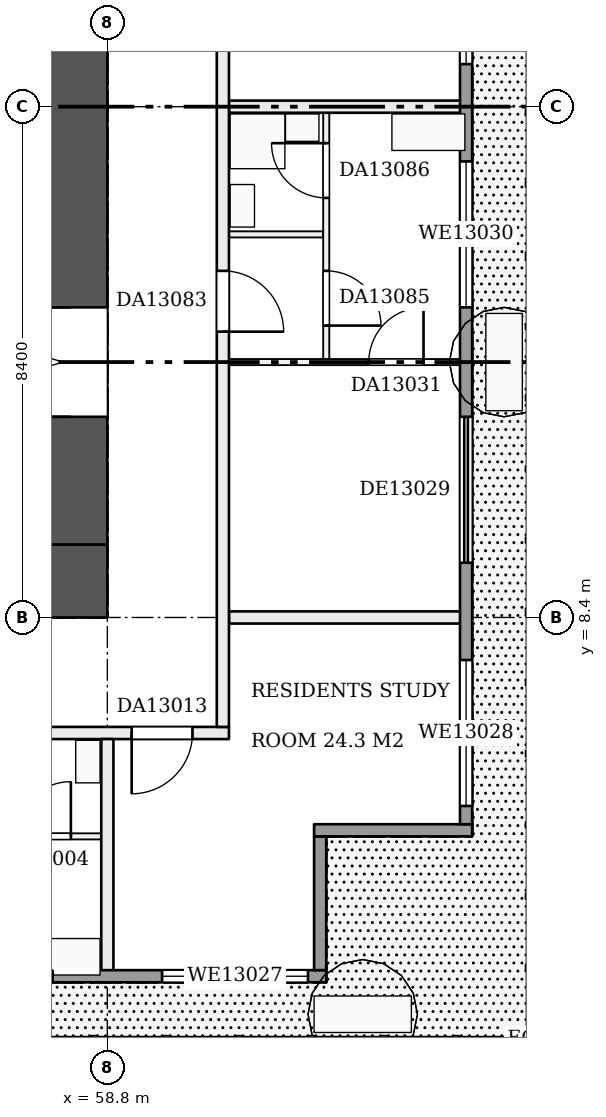
"""IFC4 building model, lengths in metres.
Left out: names, types, materials, properties, quantities, classifications, styles, units other than length and angle.
Written with IfcOpenShell. Run it as: python <this file> out.ifc"""

import sys

from ifc_helpers import new_model, si_unit, direction, frame, frame_2d, origin, place, context, subcontext, project, spatial, rectangle, extrude, element, fill, save


model = new_model("IFC4")
c1 = context("Model", 3, precision=1e-05, world=origin(), true_north=direction((0.0, 1.0)))
c2 = subcontext(c1, "Body", "Model", "MODEL_VIEW")
j1 = project(units=[si_unit("LENGTHUNIT", "METRE"), si_unit("PLANEANGLEUNIT", "RADIAN")], contexts=[c1])
p1 = place(None, origin())
s1 = spatial("IfcSite", under=j1, at=p1, CompositionType="ELEMENT")
p2 = place(p1, origin())
s2 = spatial("IfcBuilding", under=s1, at=p2, CompositionType="ELEMENT")
p3 = place(p2, frame((0.0, 0.0, 56.7)))
s3 = spatial("IfcBuildingStorey", under=s2, at=p3, CompositionType="ELEMENT", Elevation=56.7)
p4 = place(p3, frame((42.0, 9.0, 0.0), z_axis=(0.0, 0.0, 1.0), x_axis=(1.0, 0.0, 0.0)))
e1 = element("IfcWall", 1, at=p4, inside=s3, PredefinedType="SHEAR", context=c2, shape_type="SweptSolid", body=[
    extrude(rectangle(XDim=16.8, YDim=1.2, at=frame_2d((8.4, 0.0))), origin(), (0.0, 0.0, 1.0), 3.22),
])
p5 = place(p4, frame((3.1, 0.0, 0.0)))
e2 = element("IfcOpeningElement", 2, at=p5, cuts=e1, PredefinedType="OPENING", context=c2, shape_type="SweptSolid", body=[
    extrude(rectangle(XDim=1.0, YDim=2.1, at=frame_2d((0.5, 1.05))), frame((0.0, 0.61, 0.0), z_axis=(0.0, -1.0, 0.0), x_axis=(1.0, 0.0, 0.0)), (0.0, 0.0, 1.0), 1.22),
])
p6 = place(p4, frame((12.7, 0.0, 0.0)))
e3 = element("IfcOpeningElement", 3, at=p6, cuts=e1, PredefinedType="OPENING", context=c2, shape_type="SweptSolid", body=[
    extrude(rectangle(XDim=1.0, YDim=2.1, at=frame_2d((0.5, 1.05))), frame((0.0, 0.61, 0.0), z_axis=(0.0, -1.0, 0.0), x_axis=(1.0, 0.0, 0.0)), (0.0, 0.0, 1.0), 1.22),
])
p7 = place(p3, frame((58.2, 9.6, 0.0), z_axis=(0.0, 0.0, 1.0), x_axis=(0.0, 1.0, 0.0)))
e4 = element("IfcWall", 4, at=p7, inside=s3, PredefinedType="SHEAR", context=c2, shape_type="SweptSolid", body=[
    extrude(rectangle(XDim=14.4, YDim=1.2, at=frame_2d((7.2, 0.0))), origin(), (0.0, 0.0, 1.0), 3.22),
])
p8 = place(p7, frame((2.1, 0.0, 0.0)))
e5 = element("IfcOpeningElement", 5, at=p8, cuts=e4, PredefinedType="OPENING", context=c2, shape_type="SweptSolid", body=[
    extrude(rectangle(XDim=1.8, YDim=2.1, at=frame_2d((0.9, 1.05))), frame((0.0, 0.61, 0.0), z_axis=(0.0, -1.0, 0.0), x_axis=(1.0, 0.0, 0.0)), (0.0, 0.0, 1.0), 1.22),
])
p9 = place(p3, frame((54.65, 4.8, 0.0), z_axis=(0.0, 0.0, 1.0), x_axis=(1.0, 0.0, 0.0)))
e6 = element("IfcWall", 6, at=p9, inside=s3, PredefinedType="PARTITIONING", context=c2, shape_type="SweptSolid", body=[
    extrude(rectangle(XDim=4.05, YDim=0.1, at=frame_2d((2.025, 0.0))), origin(), (0.0, 0.0, 1.0), 3.22),
])
p10 = place(p9, frame((0.55, 0.0, 0.0)))
e7 = element("IfcOpeningElement", 7, at=p10, cuts=e6, PredefinedType="OPENING", context=c2, shape_type="SweptSolid", body=[
    extrude(rectangle(XDim=0.9, YDim=2.1, at=frame_2d((0.45, 1.05))), frame((0.0, 0.06, 0.0), z_axis=(0.0, -1.0, 0.0), x_axis=(1.0, 0.0, 0.0)), (0.0, 0.0, 1.0), 0.12),
])
p11 = place(p9, frame((2.65, 0.0, 0.0)))
e8 = element("IfcOpeningElement", 8, at=p11, cuts=e6, PredefinedType="OPENING", context=c2, shape_type="SweptSolid", body=[
    extrude(rectangle(XDim=0.9, YDim=2.1, at=frame_2d((0.45, 1.05))), frame((0.0, 0.06, 0.0), z_axis=(0.0, -1.0, 0.0), x_axis=(1.0, 0.0, 0.0)), (0.0, 0.0, 1.0), 0.12),
])
p12 = place(p3, frame((42.1, 6.5, 0.0), z_axis=(0.0, 0.0, 1.0), x_axis=(1.0, 0.0, 0.0)))
e9 = element("IfcWall", 9, at=p12, inside=s3, PredefinedType="PARTITIONING", context=c2, shape_type="SweptSolid", body=[
    extrude(rectangle(XDim=18.7, YDim=0.2, at=frame_2d((9.35, 0.0))), origin(), (0.0, 0.0, 1.0), 3.22),
])
p13 = place(p12, frame((4.6, 0.0, 0.0)))
e10 = element("IfcOpeningElement", 10, at=p13, cuts=e9, PredefinedType="OPENING", context=c2, shape_type="SweptSolid", body=[
    extrude(rectangle(XDim=1.0, YDim=2.1, at=frame_2d((0.5, 1.05))), frame((0.0, 0.11, 0.0), z_axis=(0.0, -1.0, 0.0), x_axis=(1.0, 0.0, 0.0)), (0.0, 0.0, 1.0), 0.22),
])
p14 = place(p12, frame((13.1, 0.0, 0.0)))
e11 = element("IfcOpeningElement", 11, at=p14, cuts=e9, PredefinedType="OPENING", context=c2, shape_type="SweptSolid", body=[
    extrude(rectangle(XDim=1.0, YDim=2.1, at=frame_2d((0.5, 1.05))), frame((0.0, 0.11, 0.0), z_axis=(0.0, -1.0, 0.0), x_axis=(1.0, 0.0, 0.0)), (0.0, 0.0, 1.0), 0.22),
])
p15 = place(p12, frame((17.1, 0.0, 0.0)))
e12 = element("IfcOpeningElement", 12, at=p15, cuts=e9, PredefinedType="OPENING", context=c2, shape_type="SweptSolid", body=[
    extrude(rectangle(XDim=1.0, YDim=2.1, at=frame_2d((0.5, 1.05))), frame((0.0, 0.11, 0.0), z_axis=(0.0, -1.0, 0.0), x_axis=(1.0, 0.0, 0.0)), (0.0, 0.0, 1.0), 0.22),
])
p16 = place(p3, frame((60.8, 8.4, 0.0), z_axis=(0.0, 0.0, 1.0), x_axis=(1.0, 0.0, 0.0)))
e13 = element("IfcWall", 13, at=p16, inside=s3, PredefinedType="PARTITIONING", context=c2, shape_type="SweptSolid", body=[
    extrude(rectangle(XDim=3.9, YDim=0.2, at=frame_2d((1.95, 0.0))), origin(), (0.0, 0.0, 1.0), 3.22),
])
p17 = place(p3, frame((60.8, 12.6, 0.0), z_axis=(0.0, 0.0, 1.0), x_axis=(1.0, 0.0, 0.0)))
e14 = element("IfcWall", 14, at=p17, inside=s3, PredefinedType="PARTITIONING", context=c2, shape_type="SweptSolid", body=[
    extrude(rectangle(XDim=3.9, YDim=0.1, at=frame_2d((1.95, 0.0))), origin(), (0.0, 0.0, 1.0), 3.22),
])
p18 = place(p17, frame((2.3, 0.0, 0.0)))
e15 = element("IfcOpeningElement", 15, at=p18, cuts=e14, PredefinedType="OPENING", context=c2, shape_type="SweptSolid", body=[
    extrude(rectangle(XDim=0.9, YDim=2.1, at=frame_2d((0.45, 1.05))), frame((0.0, 0.06, 0.0), z_axis=(0.0, -1.0, 0.0), x_axis=(1.0, 0.0, 0.0)), (0.0, 0.0, 1.0), 0.12),
])
p19 = place(p3, frame((60.8, 14.7, 0.0), z_axis=(0.0, 0.0, 1.0), x_axis=(1.0, 0.0, 0.0)))
e16 = element("IfcWall", 16, at=p19, inside=s3, PredefinedType="PARTITIONING", context=c2, shape_type="SweptSolid", body=[
    extrude(rectangle(XDim=1.55, YDim=0.1, at=frame_2d((0.775, 0.0))), origin(), (0.0, 0.0, 1.0), 3.22),
])
for number, where, z_axis, x_axis in (
    (17, (60.8, 16.8, 0.0), (0.0, 0.0, 1.0), (1.0, 0.0, 0.0)),
    (18, (58.8, 2.5, 0.0), (0.0, 0.0, 1.0), (0.0, 1.0, 0.0)),
):
    element("IfcWall", number, at=place(p3, frame(where, z_axis=z_axis, x_axis=x_axis)), inside=s3, PredefinedType="PARTITIONING", context=c2, shape_type="SweptSolid", body=[
        extrude(rectangle(XDim=3.9, YDim=0.2, at=frame_2d((1.95, 0.0))), origin(), (0.0, 0.0, 1.0), 3.22),
    ])
p20 = place(p3, frame((60.7, 6.6, 0.0), z_axis=(0.0, 0.0, 1.0), x_axis=(0.0, 1.0, 0.0)))
e19 = element("IfcWall", 19, at=p20, inside=s3, PredefinedType="PARTITIONING", context=c2, shape_type="SweptSolid", body=[
    extrude(rectangle(XDim=14.6, YDim=0.2, at=frame_2d((7.3, 0.0))), origin(), (0.0, 0.0, 1.0), 3.22),
])
p21 = place(p20, frame((6.5, 0.0, 0.0)))
e20 = element("IfcOpeningElement", 20, at=p21, cuts=e19, PredefinedType="OPENING", context=c2, shape_type="SweptSolid", body=[
    extrude(rectangle(XDim=1.0, YDim=2.1, at=frame_2d((0.5, 1.05))), frame((0.0, 0.11, 0.0), z_axis=(0.0, -1.0, 0.0), x_axis=(1.0, 0.0, 0.0)), (0.0, 0.0, 1.0), 0.22),
])
p22 = place(p20, frame((11.9, 0.0, 0.0)))
e21 = element("IfcOpeningElement", 21, at=p22, cuts=e19, PredefinedType="OPENING", context=c2, shape_type="SweptSolid", body=[
    extrude(rectangle(XDim=1.0, YDim=2.1, at=frame_2d((0.5, 1.05))), frame((0.0, 0.11, 0.0), z_axis=(0.0, -1.0, 0.0), x_axis=(1.0, 0.0, 0.0)), (0.0, 0.0, 1.0), 0.22),
])
p23 = place(p3, frame((62.4, 12.65, 0.0), z_axis=(0.0, 0.0, 1.0), x_axis=(0.0, 1.0, 0.0)))
e22 = element("IfcWall", 22, at=p23, inside=s3, PredefinedType="PARTITIONING", context=c2, shape_type="SweptSolid", body=[
    extrude(rectangle(XDim=4.05, YDim=0.1, at=frame_2d((2.025, 0.0))), origin(), (0.0, 0.0, 1.0), 3.22),
])
p24 = place(p23, frame((0.55, 0.0, 0.0)))
e23 = element("IfcOpeningElement", 23, at=p24, cuts=e22, PredefinedType="OPENING", context=c2, shape_type="SweptSolid", body=[
    extrude(rectangle(XDim=0.9, YDim=2.1, at=frame_2d((0.45, 1.05))), frame((0.0, 0.06, 0.0), z_axis=(0.0, -1.0, 0.0), x_axis=(1.0, 0.0, 0.0)), (0.0, 0.0, 1.0), 0.12),
])
p25 = place(p23, frame((2.65, 0.0, 0.0)))
e24 = element("IfcOpeningElement", 24, at=p25, cuts=e22, PredefinedType="OPENING", context=c2, shape_type="SweptSolid", body=[
    extrude(rectangle(XDim=0.9, YDim=2.1, at=frame_2d((0.45, 1.05))), frame((0.0, 0.06, 0.0), z_axis=(0.0, -1.0, 0.0), x_axis=(1.0, 0.0, 0.0)), (0.0, 0.0, 1.0), 0.12),
])
p26 = place(p3, frame((4.8, 2.5, 0.0), z_axis=(0.0, 0.0, 1.0), x_axis=(1.0, 0.0, 0.0)))
e25 = element("IfcWall", 25, at=p26, inside=s3, PredefinedType="SOLIDWALL", context=c2, shape_type="SweptSolid", body=[
    extrude(rectangle(XDim=57.6, YDim=0.2, at=frame_2d((28.8, 0.0))), origin(), (0.0, 0.0, 1.0), 3.22),
])
p27 = place(p26, frame((0.3, 0.0, 0.0)))
e26 = element("IfcOpeningElement", 26, at=p27, cuts=e25, PredefinedType="OPENING", context=c2, shape_type="SweptSolid", body=[
    extrude(rectangle(XDim=2.4, YDim=2.2, at=frame_2d((1.2, 1.1))), frame((0.0, 0.11, 0.0), z_axis=(0.0, -1.0, 0.0), x_axis=(1.0, 0.0, 0.0)), (0.0, 0.0, 1.0), 0.22),
])
p28 = place(p26, frame((4.5, 0.0, 0.0)))
e27 = element("IfcOpeningElement", 27, at=p28, cuts=e25, PredefinedType="OPENING", context=c2, shape_type="SweptSolid", body=[
    extrude(rectangle(XDim=2.4, YDim=2.2, at=frame_2d((1.2, 1.1))), frame((0.0, 0.11, 0.0), z_axis=(0.0, -1.0, 0.0), x_axis=(1.0, 0.0, 0.0)), (0.0, 0.0, 1.0), 0.22),
])
p29 = place(p26, frame((8.7, 0.0, 0.0)))
e28 = element("IfcOpeningElement", 28, at=p29, cuts=e25, PredefinedType="OPENING", context=c2, shape_type="SweptSolid", body=[
    extrude(rectangle(XDim=2.4, YDim=2.2, at=frame_2d((1.2, 1.1))), frame((0.0, 0.11, 0.0), z_axis=(0.0, -1.0, 0.0), x_axis=(1.0, 0.0, 0.0)), (0.0, 0.0, 1.0), 0.22),
])
p30 = place(p26, frame((12.9, 0.0, 0.0)))
e29 = element("IfcOpeningElement", 29, at=p30, cuts=e25, PredefinedType="OPENING", context=c2, shape_type="SweptSolid", body=[
    extrude(rectangle(XDim=2.4, YDim=2.2, at=frame_2d((1.2, 1.1))), frame((0.0, 0.11, 0.0), z_axis=(0.0, -1.0, 0.0), x_axis=(1.0, 0.0, 0.0)), (0.0, 0.0, 1.0), 0.22),
])
p31 = place(p26, frame((17.1, 0.0, 0.9)))
e30 = element("IfcOpeningElement", 30, at=p31, cuts=e25, PredefinedType="OPENING", context=c2, shape_type="SweptSolid", body=[
    extrude(rectangle(XDim=2.4, YDim=1.5, at=frame_2d((1.2, 0.75))), frame((0.0, 0.11, 0.0), z_axis=(0.0, -1.0, 0.0), x_axis=(1.0, 0.0, 0.0)), (0.0, 0.0, 1.0), 0.22),
])
p32 = place(p26, frame((21.3, 0.0, 0.0)))
e31 = element("IfcOpeningElement", 31, at=p32, cuts=e25, PredefinedType="OPENING", context=c2, shape_type="SweptSolid", body=[
    extrude(rectangle(XDim=2.4, YDim=2.2, at=frame_2d((1.2, 1.1))), frame((0.0, 0.11, 0.0), z_axis=(0.0, -1.0, 0.0), x_axis=(1.0, 0.0, 0.0)), (0.0, 0.0, 1.0), 0.22),
])
p33 = place(p26, frame((25.5, 0.0, 0.0)))
e32 = element("IfcOpeningElement", 32, at=p33, cuts=e25, PredefinedType="OPENING", context=c2, shape_type="SweptSolid", body=[
    extrude(rectangle(XDim=2.4, YDim=2.2, at=frame_2d((1.2, 1.1))), frame((0.0, 0.11, 0.0), z_axis=(0.0, -1.0, 0.0), x_axis=(1.0, 0.0, 0.0)), (0.0, 0.0, 1.0), 0.22),
])
p34 = place(p26, frame((29.7, 0.0, 0.9)))
e33 = element("IfcOpeningElement", 33, at=p34, cuts=e25, PredefinedType="OPENING", context=c2, shape_type="SweptSolid", body=[
    extrude(rectangle(XDim=2.4, YDim=1.5, at=frame_2d((1.2, 0.75))), frame((0.0, 0.11, 0.0), z_axis=(0.0, -1.0, 0.0), x_axis=(1.0, 0.0, 0.0)), (0.0, 0.0, 1.0), 0.22),
])
p35 = place(p26, frame((33.9, 0.0, 0.0)))
e34 = element("IfcOpeningElement", 34, at=p35, cuts=e25, PredefinedType="OPENING", context=c2, shape_type="SweptSolid", body=[
    extrude(rectangle(XDim=2.4, YDim=2.2, at=frame_2d((1.2, 1.1))), frame((0.0, 0.11, 0.0), z_axis=(0.0, -1.0, 0.0), x_axis=(1.0, 0.0, 0.0)), (0.0, 0.0, 1.0), 0.22),
])
p36 = place(p26, frame((38.1, 0.0, 0.0)))
e35 = element("IfcOpeningElement", 35, at=p36, cuts=e25, PredefinedType="OPENING", context=c2, shape_type="SweptSolid", body=[
    extrude(rectangle(XDim=2.4, YDim=2.2, at=frame_2d((1.2, 1.1))), frame((0.0, 0.11, 0.0), z_axis=(0.0, -1.0, 0.0), x_axis=(1.0, 0.0, 0.0)), (0.0, 0.0, 1.0), 0.22),
])
p37 = place(p26, frame((42.3, 0.0, 0.9)))
e36 = element("IfcOpeningElement", 36, at=p37, cuts=e25, PredefinedType="OPENING", context=c2, shape_type="SweptSolid", body=[
    extrude(rectangle(XDim=2.4, YDim=1.5, at=frame_2d((1.2, 0.75))), frame((0.0, 0.11, 0.0), z_axis=(0.0, -1.0, 0.0), x_axis=(1.0, 0.0, 0.0)), (0.0, 0.0, 1.0), 0.22),
])
p38 = place(p26, frame((46.5, 0.0, 0.0)))
e37 = element("IfcOpeningElement", 37, at=p38, cuts=e25, PredefinedType="OPENING", context=c2, shape_type="SweptSolid", body=[
    extrude(rectangle(XDim=2.4, YDim=2.2, at=frame_2d((1.2, 1.1))), frame((0.0, 0.11, 0.0), z_axis=(0.0, -1.0, 0.0), x_axis=(1.0, 0.0, 0.0)), (0.0, 0.0, 1.0), 0.22),
])
p39 = place(p26, frame((50.7, 0.0, 0.9)))
e38 = element("IfcOpeningElement", 38, at=p39, cuts=e25, PredefinedType="OPENING", context=c2, shape_type="SweptSolid", body=[
    extrude(rectangle(XDim=2.4, YDim=1.5, at=frame_2d((1.2, 0.75))), frame((0.0, 0.11, 0.0), z_axis=(0.0, -1.0, 0.0), x_axis=(1.0, 0.0, 0.0)), (0.0, 0.0, 1.0), 0.22),
])
p40 = place(p26, frame((54.9, 0.0, 0.9)))
e39 = element("IfcOpeningElement", 39, at=p40, cuts=e25, PredefinedType="OPENING", context=c2, shape_type="SweptSolid", body=[
    extrude(rectangle(XDim=2.4, YDim=1.5, at=frame_2d((1.2, 0.75))), frame((0.0, 0.11, 0.0), z_axis=(0.0, -1.0, 0.0), x_axis=(1.0, 0.0, 0.0)), (0.0, 0.0, 1.0), 0.22),
])
p41 = place(p3, frame((62.3, 2.6, 0.0), z_axis=(0.0, 0.0, 1.0), x_axis=(0.0, 1.0, 0.0)))
e40 = element("IfcWall", 40, at=p41, inside=s3, PredefinedType="SOLIDWALL", context=c2, shape_type="SweptSolid", body=[
    extrude(rectangle(XDim=2.2, YDim=0.2, at=frame_2d((1.1, 0.0))), origin(), (0.0, 0.0, 1.0), 3.22),
])
p42 = place(p3, frame((62.2, 4.9, 0.0), z_axis=(0.0, 0.0, 1.0), x_axis=(1.0, 0.0, 0.0)))
e41 = element("IfcWall", 41, at=p42, inside=s3, PredefinedType="SOLIDWALL", context=c2, shape_type="SweptSolid", body=[
    extrude(rectangle(XDim=2.6, YDim=0.2, at=frame_2d((1.3, 0.0))), origin(), (0.0, 0.0, 1.0), 3.22),
])
p43 = place(p3, frame((64.7, 5.0, 0.0), z_axis=(0.0, 0.0, 1.0), x_axis=(0.0, 1.0, 0.0)))
e42 = element("IfcWall", 42, at=p43, inside=s3, PredefinedType="SOLIDWALL", context=c2, shape_type="SweptSolid", body=[
    extrude(rectangle(XDim=15.2, YDim=0.2, at=frame_2d((7.6, 0.0))), origin(), (0.0, 0.0, 1.0), 3.22),
])
p44 = place(p43, frame((0.3, 0.0, 0.9)))
e43 = element("IfcOpeningElement", 43, at=p44, cuts=e42, PredefinedType="OPENING", context=c2, shape_type="SweptSolid", body=[
    extrude(rectangle(XDim=2.4, YDim=1.5, at=frame_2d((1.2, 0.75))), frame((0.0, 0.11, 0.0), z_axis=(0.0, -1.0, 0.0), x_axis=(1.0, 0.0, 0.0)), (0.0, 0.0, 1.0), 0.22),
])
p45 = place(p43, frame((4.3, 0.0, 0.0)))
e44 = element("IfcOpeningElement", 44, at=p45, cuts=e42, PredefinedType="OPENING", context=c2, shape_type="SweptSolid", body=[
    extrude(rectangle(XDim=2.4, YDim=2.2, at=frame_2d((1.2, 1.1))), frame((0.0, 0.11, 0.0), z_axis=(0.0, -1.0, 0.0), x_axis=(1.0, 0.0, 0.0)), (0.0, 0.0, 1.0), 0.22),
])
p46 = place(p43, frame((8.5, 0.0, 0.9)))
e45 = element("IfcOpeningElement", 45, at=p46, cuts=e42, PredefinedType="OPENING", context=c2, shape_type="SweptSolid", body=[
    extrude(rectangle(XDim=2.4, YDim=1.5, at=frame_2d((1.2, 0.75))), frame((0.0, 0.11, 0.0), z_axis=(0.0, -1.0, 0.0), x_axis=(1.0, 0.0, 0.0)), (0.0, 0.0, 1.0), 0.22),
])
p47 = place(p43, frame((12.5, 0.0, 0.9)))
e46 = element("IfcOpeningElement", 46, at=p47, cuts=e42, PredefinedType="OPENING", context=c2, shape_type="SweptSolid", body=[
    extrude(rectangle(XDim=2.4, YDim=1.5, at=frame_2d((1.2, 0.75))), frame((0.0, 0.11, 0.0), z_axis=(0.0, -1.0, 0.0), x_axis=(1.0, 0.0, 0.0)), (0.0, 0.0, 1.0), 0.22),
])
p48 = place(p8, origin())
e47 = element("IfcDoor", 47, at=p48, inside=s3, OperationType="DOUBLE_DOOR_SINGLE_SWING", PredefinedType="DOOR", context=c2, shape_type="SweptSolid", body=[
    extrude(rectangle(XDim=1.8, YDim=2.1, at=frame_2d((0.9, 1.05))), frame((0.0, 0.025, 0.0), z_axis=(0.0, -1.0, 0.0), x_axis=(1.0, 0.0, 0.0)), (0.0, 0.0, 1.0), 0.05),
])
fill(e5, e47)
p49 = place(p11, origin())
e48 = element("IfcDoor", 48, at=p49, inside=s3, OperationType="SINGLE_SWING_RIGHT", PredefinedType="DOOR", context=c2, shape_type="SweptSolid", body=[
    extrude(rectangle(XDim=0.9, YDim=2.1, at=frame_2d((0.45, 1.05))), frame((0.0, 0.025, 0.0), z_axis=(0.0, -1.0, 0.0), x_axis=(1.0, 0.0, 0.0)), (0.0, 0.0, 1.0), 0.05),
])
fill(e8, e48)
p50 = place(p15, frame((1.0, 0.0, 0.0), z_axis=(0.0, 0.0, 1.0), x_axis=(-1.0, 0.0, 0.0)))
e49 = element("IfcDoor", 49, at=p50, inside=s3, OperationType="SINGLE_SWING_RIGHT", PredefinedType="DOOR", context=c2, shape_type="SweptSolid", body=[
    extrude(rectangle(XDim=1.0, YDim=2.1, at=frame_2d((0.5, 1.05))), frame((0.0, 0.025, 0.0), z_axis=(0.0, -1.0, 0.0), x_axis=(1.0, 0.0, 0.0)), (0.0, 0.0, 1.0), 0.05),
])
fill(e12, e49)
p51 = place(p18, origin())
e50 = element("IfcDoor", 50, at=p51, inside=s3, OperationType="SINGLE_SWING_RIGHT", PredefinedType="DOOR", context=c2, shape_type="SweptSolid", body=[
    extrude(rectangle(XDim=0.9, YDim=2.1, at=frame_2d((0.45, 1.05))), frame((0.0, 0.025, 0.0), z_axis=(0.0, -1.0, 0.0), x_axis=(1.0, 0.0, 0.0)), (0.0, 0.0, 1.0), 0.05),
])
fill(e15, e50)
p52 = place(p21, frame((1.0, 0.0, 0.0), z_axis=(0.0, 0.0, 1.0), x_axis=(-1.0, 0.0, 0.0)))
e51 = element("IfcDoor", 51, at=p52, inside=s3, OperationType="SINGLE_SWING_RIGHT", PredefinedType="DOOR", context=c2, shape_type="SweptSolid", body=[
    extrude(rectangle(XDim=1.0, YDim=2.1, at=frame_2d((0.5, 1.05))), frame((0.0, 0.025, 0.0), z_axis=(0.0, -1.0, 0.0), x_axis=(1.0, 0.0, 0.0)), (0.0, 0.0, 1.0), 0.05),
])
fill(e20, e51)
p53 = place(p24, frame((0.9, 0.0, 0.0), z_axis=(0.0, 0.0, 1.0), x_axis=(-1.0, 0.0, 0.0)))
e52 = element("IfcDoor", 52, at=p53, inside=s3, OperationType="SINGLE_SWING_RIGHT", PredefinedType="DOOR", context=c2, shape_type="SweptSolid", body=[
    extrude(rectangle(XDim=0.9, YDim=2.1, at=frame_2d((0.45, 1.05))), frame((0.0, 0.025, 0.0), z_axis=(0.0, -1.0, 0.0), x_axis=(1.0, 0.0, 0.0)), (0.0, 0.0, 1.0), 0.05),
])
fill(e23, e52)
p54 = place(p25, origin())
e53 = element("IfcDoor", 53, at=p54, inside=s3, OperationType="SINGLE_SWING_RIGHT", PredefinedType="DOOR", context=c2, shape_type="SweptSolid", body=[
    extrude(rectangle(XDim=0.9, YDim=2.1, at=frame_2d((0.45, 1.05))), frame((0.0, 0.025, 0.0), z_axis=(0.0, -1.0, 0.0), x_axis=(1.0, 0.0, 0.0)), (0.0, 0.0, 1.0), 0.05),
])
fill(e24, e53)
p55 = place(p40, origin())
e54 = element("IfcWindow", 54, at=p55, inside=s3, PartitioningType="SINGLE_PANEL", PredefinedType="WINDOW", context=c2, shape_type="SweptSolid", body=[
    extrude(rectangle(XDim=2.4, YDim=1.5, at=frame_2d((1.2, 0.75))), frame((0.0, 0.03, 0.0), z_axis=(0.0, -1.0, 0.0), x_axis=(1.0, 0.0, 0.0)), (0.0, 0.0, 1.0), 0.06),
])
fill(e39, e54)
p56 = place(p44, origin())
e55 = element("IfcWindow", 55, at=p56, inside=s3, PartitioningType="SINGLE_PANEL", PredefinedType="WINDOW", context=c2, shape_type="SweptSolid", body=[
    extrude(rectangle(XDim=2.4, YDim=1.5, at=frame_2d((1.2, 0.75))), frame((0.0, 0.03, 0.0), z_axis=(0.0, -1.0, 0.0), x_axis=(1.0, 0.0, 0.0)), (0.0, 0.0, 1.0), 0.06),
])
fill(e43, e55)
p57 = place(p45, origin())
e56 = element("IfcDoor", 56, at=p57, inside=s3, OperationType="DOUBLE_DOOR_SLIDING", PredefinedType="DOOR", context=c2, shape_type="SweptSolid", body=[
    extrude(rectangle(XDim=2.4, YDim=2.2, at=frame_2d((1.2, 1.1))), frame((0.0, 0.025, 0.0), z_axis=(0.0, -1.0, 0.0), x_axis=(1.0, 0.0, 0.0)), (0.0, 0.0, 1.0), 0.05),
])
fill(e44, e56)
p58 = place(p46, origin())
e57 = element("IfcWindow", 57, at=p58, inside=s3, PartitioningType="SINGLE_PANEL", PredefinedType="WINDOW", context=c2, shape_type="SweptSolid", body=[
    extrude(rectangle(XDim=2.4, YDim=1.5, at=frame_2d((1.2, 0.75))), frame((0.0, 0.03, 0.0), z_axis=(0.0, -1.0, 0.0), x_axis=(1.0, 0.0, 0.0)), (0.0, 0.0, 1.0), 0.06),
])
fill(e45, e57)
p59 = place(p47, origin())
e58 = element("IfcWindow", 58, at=p59, inside=s3, PartitioningType="SINGLE_PANEL", PredefinedType="WINDOW", context=c2, shape_type="SweptSolid", body=[
    extrude(rectangle(XDim=2.4, YDim=1.5, at=frame_2d((1.2, 0.75))), frame((0.0, 0.03, 0.0), z_axis=(0.0, -1.0, 0.0), x_axis=(1.0, 0.0, 0.0)), (0.0, 0.0, 1.0), 0.06),
])
fill(e46, e58)
save(model, sys.argv[1])
